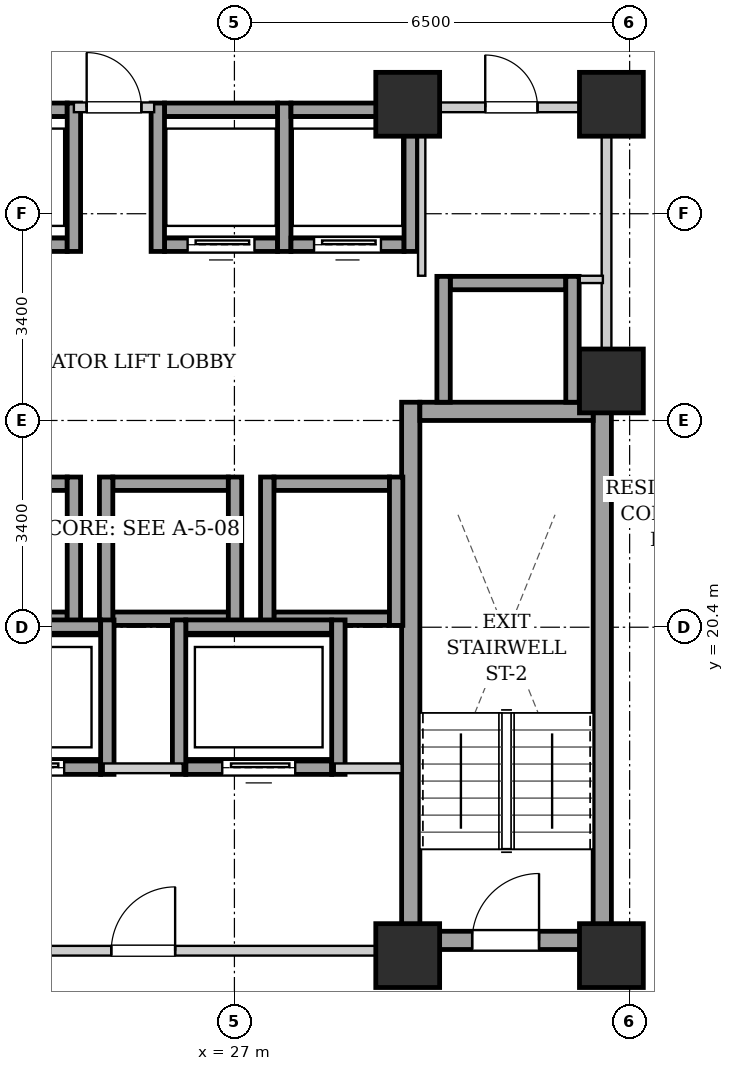
"""IFC4 building model, lengths in metres.
Left out: names, types, materials, properties, quantities, classifications, styles, units other than length and angle.
Written with IfcOpenShell. Run it as: python <this file> out.ifc"""

import sys

from ifc_helpers import new_model, si_unit, direction, frame, frame_2d, origin, origin_2d, place, context, subcontext, project, spatial, rectangle, extrude, element, fill, save


model = new_model("IFC4")
c1 = context("Model", 3, precision=1e-05, world=origin(), true_north=direction((0.0, 1.0)))
c2 = subcontext(c1, "Body", "Model", "MODEL_VIEW")
j1 = project(units=[si_unit("LENGTHUNIT", "METRE"), si_unit("PLANEANGLEUNIT", "RADIAN")], contexts=[c1])
p1 = place(None, origin())
s1 = spatial("IfcSite", under=j1, at=p1, CompositionType="ELEMENT")
p2 = place(p1, origin())
s2 = spatial("IfcBuilding", under=s1, at=p2, CompositionType="ELEMENT")
p3 = place(p2, frame((0.0, 0.0, 84.7)))
s3 = spatial("IfcBuildingStorey", under=s2, at=p3, CompositionType="ELEMENT", Elevation=84.7)
for number, where, z_axis, x_axis in (
    (1, (29.85, 15.0, 0.0), (0.0, 0.0, 1.0), (1.0, 0.0, 0.0)),
    (2, (33.2, 15.0, 0.0), (0.0, 0.0, 1.0), (1.0, 0.0, 0.0)),
    (3, (29.85, 29.0, 0.0), (0.0, 0.0, 1.0), (1.0, 0.0, 0.0)),
    (4, (33.2, 29.0, 0.0), (0.0, 0.0, 1.0), (1.0, 0.0, 0.0)),
    (5, (33.2, 24.45, 0.0), (0.0, 0.0, 1.0), (1.0, 0.0, 0.0)),
):
    element("IfcColumn", number, at=place(p3, frame(where, z_axis=z_axis, x_axis=x_axis)), inside=s3, PredefinedType="COLUMN", context=c2, shape_type="SweptSolid", body=[
        extrude(rectangle(XDim=1.05, YDim=1.05, at=origin_2d()), origin(), (0.0, 0.0, 1.0), 3.2),
    ])
for number, where, z_axis, x_axis in (
    (6, (29.9, 15.1, 0.0), (0.0, 0.0, 1.0), (0.0, 1.0, 0.0)),
    (7, (33.05, 15.1, 0.0), (0.0, 0.0, 1.0), (0.0, 1.0, 0.0)),
):
    element("IfcWall", number, at=place(p3, frame(where, z_axis=z_axis, x_axis=x_axis)), inside=s3, PredefinedType="SHEAR", context=c2, shape_type="SweptSolid", body=[
        extrude(rectangle(XDim=9.0, YDim=0.3, at=frame_2d((4.5, 0.0))), origin(), (0.0, 0.0, 1.0), 2.94),
    ])
p4 = place(p3, frame((30.05, 23.95, 0.0), z_axis=(0.0, 0.0, 1.0), x_axis=(1.0, 0.0, 0.0)))
e8 = element("IfcWall", 8, at=p4, inside=s3, PredefinedType="SHEAR", context=c2, shape_type="SweptSolid", body=[
    extrude(rectangle(XDim=2.85, YDim=0.3, at=frame_2d((1.425, 0.0))), origin(), (0.0, 0.0, 1.0), 2.94),
])
p5 = place(p3, frame((30.05, 15.25, 0.0), z_axis=(0.0, 0.0, 1.0), x_axis=(1.0, 0.0, 0.0)))
e9 = element("IfcWall", 9, at=p5, inside=s3, PredefinedType="SHEAR", context=c2, shape_type="SweptSolid", body=[
    extrude(rectangle(XDim=2.85, YDim=0.3, at=frame_2d((1.425, 0.0))), origin(), (0.0, 0.0, 1.0), 2.94),
])
p6 = place(p5, frame((0.86, 0.0, 0.0)))
e10 = element("IfcOpeningElement", 10, at=p6, cuts=e9, PredefinedType="OPENING", context=c2, shape_type="SweptSolid", body=[
    extrude(rectangle(XDim=1.1, YDim=2.05, at=frame_2d((0.55, 1.025))), frame((0.0, 0.16, 0.0), z_axis=(0.0, -1.0, 0.0), x_axis=(1.0, 0.0, 0.0)), (0.0, 0.0, 1.0), 0.32),
])
p7 = place(p3, frame((22.35, 26.69, 0.0), z_axis=(0.0, 0.0, 1.0), x_axis=(1.0, 0.0, 0.0)))
e11 = element("IfcWall", 11, at=p7, inside=s3, PredefinedType="SHEAR", context=c2, shape_type="SweptSolid", body=[
    extrude(rectangle(XDim=1.9, YDim=0.22, at=frame_2d((0.95, 0.0))), origin(), (0.0, 0.0, 1.0), 2.94),
])
p8 = place(p7, frame((0.4, 0.0, 0.0)))
e12 = element("IfcOpeningElement", 12, at=p8, cuts=e11, PredefinedType="OPENING", context=c2, shape_type="SweptSolid", body=[
    extrude(rectangle(XDim=1.1, YDim=2.15, at=frame_2d((0.55, 1.075))), frame((0.0, 0.12, 0.0), z_axis=(0.0, -1.0, 0.0), x_axis=(1.0, 0.0, 0.0)), (0.0, 0.0, 1.0), 0.24),
])
p9 = place(p3, frame((22.35, 28.91, 0.0), z_axis=(0.0, 0.0, 1.0), x_axis=(1.0, 0.0, 0.0)))
e13 = element("IfcWall", 13, at=p9, inside=s3, PredefinedType="SHEAR", context=c2, shape_type="SweptSolid", body=[
    extrude(rectangle(XDim=1.9, YDim=0.22, at=frame_2d((0.95, 0.0))), origin(), (0.0, 0.0, 1.0), 2.94),
])
p10 = place(p3, frame((24.36, 26.58, 0.0), z_axis=(0.0, 0.0, 1.0), x_axis=(0.0, 1.0, 0.0)))
e14 = element("IfcWall", 14, at=p10, inside=s3, PredefinedType="SHEAR", context=c2, shape_type="SweptSolid", body=[
    extrude(rectangle(XDim=2.44, YDim=0.22, at=frame_2d((1.22, 0.0))), origin(), (0.0, 0.0, 1.0), 2.94),
])
p11 = place(p3, frame((25.85, 26.69, 0.0), z_axis=(0.0, 0.0, 1.0), x_axis=(1.0, 0.0, 0.0)))
e15 = element("IfcWall", 15, at=p11, inside=s3, PredefinedType="SHEAR", context=c2, shape_type="SweptSolid", body=[
    extrude(rectangle(XDim=1.86, YDim=0.22, at=frame_2d((0.93, 0.0))), origin(), (0.0, 0.0, 1.0), 2.94),
])
p12 = place(p11, frame((0.38, 0.0, 0.0)))
e16 = element("IfcOpeningElement", 16, at=p12, cuts=e15, PredefinedType="OPENING", context=c2, shape_type="SweptSolid", body=[
    extrude(rectangle(XDim=1.1, YDim=2.15, at=frame_2d((0.55, 1.075))), frame((0.0, 0.12, 0.0), z_axis=(0.0, -1.0, 0.0), x_axis=(1.0, 0.0, 0.0)), (0.0, 0.0, 1.0), 0.24),
])
p13 = place(p3, frame((25.85, 28.91, 0.0), z_axis=(0.0, 0.0, 1.0), x_axis=(1.0, 0.0, 0.0)))
e17 = element("IfcWall", 17, at=p13, inside=s3, PredefinedType="SHEAR", context=c2, shape_type="SweptSolid", body=[
    extrude(rectangle(XDim=1.86, YDim=0.22, at=frame_2d((0.93, 0.0))), origin(), (0.0, 0.0, 1.0), 2.94),
])
for number, where, z_axis, x_axis in (
    (18, (25.74, 26.58, 0.0), (0.0, 0.0, 1.0), (0.0, 1.0, 0.0)),
    (19, (27.82, 26.58, 0.0), (0.0, 0.0, 1.0), (0.0, 1.0, 0.0)),
):
    element("IfcWall", number, at=place(p3, frame(where, z_axis=z_axis, x_axis=x_axis)), inside=s3, PredefinedType="SHEAR", context=c2, shape_type="SweptSolid", body=[
        extrude(rectangle(XDim=2.44, YDim=0.22, at=frame_2d((1.22, 0.0))), origin(), (0.0, 0.0, 1.0), 2.94),
    ])
p14 = place(p3, frame((27.93, 26.69, 0.0), z_axis=(0.0, 0.0, 1.0), x_axis=(1.0, 0.0, 0.0)))
e20 = element("IfcWall", 20, at=p14, inside=s3, PredefinedType="SHEAR", context=c2, shape_type="SweptSolid", body=[
    extrude(rectangle(XDim=1.86, YDim=0.22, at=frame_2d((0.93, 0.0))), origin(), (0.0, 0.0, 1.0), 2.94),
])
p15 = place(p14, frame((0.38, 0.0, 0.0)))
e21 = element("IfcOpeningElement", 21, at=p15, cuts=e20, PredefinedType="OPENING", context=c2, shape_type="SweptSolid", body=[
    extrude(rectangle(XDim=1.1, YDim=2.15, at=frame_2d((0.55, 1.075))), frame((0.0, 0.12, 0.0), z_axis=(0.0, -1.0, 0.0), x_axis=(1.0, 0.0, 0.0)), (0.0, 0.0, 1.0), 0.24),
])
p16 = place(p3, frame((27.93, 28.91, 0.0), z_axis=(0.0, 0.0, 1.0), x_axis=(1.0, 0.0, 0.0)))
e22 = element("IfcWall", 22, at=p16, inside=s3, PredefinedType="SHEAR", context=c2, shape_type="SweptSolid", body=[
    extrude(rectangle(XDim=1.86, YDim=0.22, at=frame_2d((0.93, 0.0))), origin(), (0.0, 0.0, 1.0), 2.94),
])
p17 = place(p3, frame((29.9, 26.58, 0.0), z_axis=(0.0, 0.0, 1.0), x_axis=(0.0, 1.0, 0.0)))
e23 = element("IfcWall", 23, at=p17, inside=s3, PredefinedType="SHEAR", context=c2, shape_type="SweptSolid", body=[
    extrude(rectangle(XDim=2.44, YDim=0.22, at=frame_2d((1.22, 0.0))), origin(), (0.0, 0.0, 1.0), 2.94),
])
for number, where, z_axis, x_axis in (
    (24, (22.35, 20.54, 0.0), (0.0, 0.0, 1.0), (1.0, 0.0, 0.0)),
    (25, (22.35, 22.76, 0.0), (0.0, 0.0, 1.0), (1.0, 0.0, 0.0)),
):
    element("IfcWall", number, at=place(p3, frame(where, z_axis=z_axis, x_axis=x_axis)), inside=s3, PredefinedType="SHEAR", context=c2, shape_type="SweptSolid", body=[
        extrude(rectangle(XDim=1.9, YDim=0.22, at=frame_2d((0.95, 0.0))), origin(), (0.0, 0.0, 1.0), 2.94),
    ])
p18 = place(p3, frame((24.36, 20.43, 0.0), z_axis=(0.0, 0.0, 1.0), x_axis=(0.0, 1.0, 0.0)))
e26 = element("IfcWall", 26, at=p18, inside=s3, PredefinedType="SHEAR", context=c2, shape_type="SweptSolid", body=[
    extrude(rectangle(XDim=2.44, YDim=0.22, at=frame_2d((1.22, 0.0))), origin(), (0.0, 0.0, 1.0), 2.94),
])
for number, where, z_axis, x_axis in (
    (27, (25.0, 20.54, 0.0), (0.0, 0.0, 1.0), (1.0, 0.0, 0.0)),
    (28, (25.0, 22.76, 0.0), (0.0, 0.0, 1.0), (1.0, 0.0, 0.0)),
):
    element("IfcWall", number, at=place(p3, frame(where, z_axis=z_axis, x_axis=x_axis)), inside=s3, PredefinedType="SHEAR", context=c2, shape_type="SweptSolid", body=[
        extrude(rectangle(XDim=1.9, YDim=0.22, at=frame_2d((0.95, 0.0))), origin(), (0.0, 0.0, 1.0), 2.94),
    ])
for number, where, z_axis, x_axis in (
    (29, (24.89, 20.43, 0.0), (0.0, 0.0, 1.0), (0.0, 1.0, 0.0)),
    (30, (27.01, 20.43, 0.0), (0.0, 0.0, 1.0), (0.0, 1.0, 0.0)),
):
    element("IfcWall", number, at=place(p3, frame(where, z_axis=z_axis, x_axis=x_axis)), inside=s3, PredefinedType="SHEAR", context=c2, shape_type="SweptSolid", body=[
        extrude(rectangle(XDim=2.44, YDim=0.22, at=frame_2d((1.22, 0.0))), origin(), (0.0, 0.0, 1.0), 2.94),
    ])
for number, where, z_axis, x_axis in (
    (31, (27.65, 20.54, 0.0), (0.0, 0.0, 1.0), (1.0, 0.0, 0.0)),
    (32, (27.65, 22.76, 0.0), (0.0, 0.0, 1.0), (1.0, 0.0, 0.0)),
):
    element("IfcWall", number, at=place(p3, frame(where, z_axis=z_axis, x_axis=x_axis)), inside=s3, PredefinedType="SHEAR", context=c2, shape_type="SweptSolid", body=[
        extrude(rectangle(XDim=1.9, YDim=0.22, at=frame_2d((0.95, 0.0))), origin(), (0.0, 0.0, 1.0), 2.94),
    ])
for number, where, z_axis, x_axis in (
    (33, (27.54, 20.43, 0.0), (0.0, 0.0, 1.0), (0.0, 1.0, 0.0)),
    (34, (29.66, 20.43, 0.0), (0.0, 0.0, 1.0), (0.0, 1.0, 0.0)),
):
    element("IfcWall", number, at=place(p3, frame(where, z_axis=z_axis, x_axis=x_axis)), inside=s3, PredefinedType="SHEAR", context=c2, shape_type="SweptSolid", body=[
        extrude(rectangle(XDim=2.44, YDim=0.22, at=frame_2d((1.22, 0.0))), origin(), (0.0, 0.0, 1.0), 2.94),
    ])
p19 = place(p3, frame((30.55, 26.06, 0.0), z_axis=(0.0, 0.0, 1.0), x_axis=(1.0, 0.0, 0.0)))
e35 = element("IfcWall", 35, at=p19, inside=s3, PredefinedType="SHEAR", context=c2, shape_type="SweptSolid", body=[
    extrude(rectangle(XDim=1.9, YDim=0.22, at=frame_2d((0.95, 0.0))), origin(), (0.0, 0.0, 1.0), 2.94),
])
for number, where, z_axis, x_axis in (
    (36, (30.44, 24.1, 0.0), (0.0, 0.0, 1.0), (0.0, 1.0, 0.0)),
    (37, (32.56, 24.1, 0.0), (0.0, 0.0, 1.0), (0.0, 1.0, 0.0)),
):
    element("IfcWall", number, at=place(p3, frame(where, z_axis=z_axis, x_axis=x_axis)), inside=s3, PredefinedType="SHEAR", context=c2, shape_type="SweptSolid", body=[
        extrude(rectangle(XDim=2.07, YDim=0.22, at=frame_2d((1.035, 0.0))), origin(), (0.0, 0.0, 1.0), 2.94),
    ])
p20 = place(p3, frame((22.4, 18.09, 0.0), z_axis=(0.0, 0.0, 1.0), x_axis=(1.0, 0.0, 0.0)))
e38 = element("IfcWall", 38, at=p20, inside=s3, PredefinedType="SHEAR", context=c2, shape_type="SweptSolid", body=[
    extrude(rectangle(XDim=2.4, YDim=0.22, at=frame_2d((1.2, 0.0))), origin(), (0.0, 0.0, 1.0), 2.94),
])
p21 = place(p20, frame((0.6, 0.0, 0.0)))
e39 = element("IfcOpeningElement", 39, at=p21, cuts=e38, PredefinedType="OPENING", context=c2, shape_type="SweptSolid", body=[
    extrude(rectangle(XDim=1.2, YDim=2.15, at=frame_2d((0.6, 1.075))), frame((0.0, 0.12, 0.0), z_axis=(0.0, -1.0, 0.0), x_axis=(1.0, 0.0, 0.0)), (0.0, 0.0, 1.0), 0.24),
])
p22 = place(p3, frame((22.4, 20.41, 0.0), z_axis=(0.0, 0.0, 1.0), x_axis=(1.0, 0.0, 0.0)))
e40 = element("IfcWall", 40, at=p22, inside=s3, PredefinedType="SHEAR", context=c2, shape_type="SweptSolid", body=[
    extrude(rectangle(XDim=2.4, YDim=0.22, at=frame_2d((1.2, 0.0))), origin(), (0.0, 0.0, 1.0), 2.94),
])
p23 = place(p3, frame((24.91, 17.98, 0.0), z_axis=(0.0, 0.0, 1.0), x_axis=(0.0, 1.0, 0.0)))
e41 = element("IfcWall", 41, at=p23, inside=s3, PredefinedType="SHEAR", context=c2, shape_type="SweptSolid", body=[
    extrude(rectangle(XDim=2.54, YDim=0.22, at=frame_2d((1.27, 0.0))), origin(), (0.0, 0.0, 1.0), 2.94),
])
p24 = place(p3, frame((26.2, 18.09, 0.0), z_axis=(0.0, 0.0, 1.0), x_axis=(1.0, 0.0, 0.0)))
e42 = element("IfcWall", 42, at=p24, inside=s3, PredefinedType="SHEAR", context=c2, shape_type="SweptSolid", body=[
    extrude(rectangle(XDim=2.4, YDim=0.22, at=frame_2d((1.2, 0.0))), origin(), (0.0, 0.0, 1.0), 2.94),
])
p25 = place(p24, frame((0.6, 0.0, 0.0)))
e43 = element("IfcOpeningElement", 43, at=p25, cuts=e42, PredefinedType="OPENING", context=c2, shape_type="SweptSolid", body=[
    extrude(rectangle(XDim=1.2, YDim=2.15, at=frame_2d((0.6, 1.075))), frame((0.0, 0.12, 0.0), z_axis=(0.0, -1.0, 0.0), x_axis=(1.0, 0.0, 0.0)), (0.0, 0.0, 1.0), 0.24),
])
p26 = place(p3, frame((26.2, 20.41, 0.0), z_axis=(0.0, 0.0, 1.0), x_axis=(1.0, 0.0, 0.0)))
e44 = element("IfcWall", 44, at=p26, inside=s3, PredefinedType="SHEAR", context=c2, shape_type="SweptSolid", body=[
    extrude(rectangle(XDim=2.4, YDim=0.22, at=frame_2d((1.2, 0.0))), origin(), (0.0, 0.0, 1.0), 2.94),
])
for number, where, z_axis, x_axis in (
    (45, (26.09, 17.98, 0.0), (0.0, 0.0, 1.0), (0.0, 1.0, 0.0)),
    (46, (28.71, 17.98, 0.0), (0.0, 0.0, 1.0), (0.0, 1.0, 0.0)),
):
    element("IfcWall", number, at=place(p3, frame(where, z_axis=z_axis, x_axis=x_axis)), inside=s3, PredefinedType="SHEAR", context=c2, shape_type="SweptSolid", body=[
        extrude(rectangle(XDim=2.54, YDim=0.22, at=frame_2d((1.27, 0.0))), origin(), (0.0, 0.0, 1.0), 2.94),
    ])
p27 = place(p3, frame((21.25, 15.08, 0.0), z_axis=(0.0, 0.0, 1.0), x_axis=(1.0, 0.0, 0.0)))
e47 = element("IfcWall", 47, at=p27, inside=s3, PredefinedType="PARTITIONING", context=c2, shape_type="SweptSolid", body=[
    extrude(rectangle(XDim=8.5, YDim=0.16, at=frame_2d((4.25, 0.0))), origin(), (0.0, 0.0, 1.0), 2.309),
])
p28 = place(p27, frame((3.725, 0.0, 0.0)))
e48 = element("IfcOpeningElement", 48, at=p28, cuts=e47, PredefinedType="OPENING", context=c2, shape_type="SweptSolid", body=[
    extrude(rectangle(XDim=1.05, YDim=2.05, at=frame_2d((0.525, 1.025))), frame((0.0, 0.09, 0.0), z_axis=(0.0, -1.0, 0.0), x_axis=(1.0, 0.0, 0.0)), (0.0, 0.0, 1.0), 0.18),
])
p29 = place(p3, frame((24.85, 18.08, 0.0), z_axis=(0.0, 0.0, 1.0), x_axis=(1.0, 0.0, 0.0)))
e49 = element("IfcWall", 49, at=p29, inside=s3, PredefinedType="PARTITIONING", context=c2, shape_type="SweptSolid", body=[
    extrude(rectangle(XDim=1.3, YDim=0.16, at=frame_2d((0.65, 0.0))), origin(), (0.0, 0.0, 1.0), 2.94),
])
p30 = place(p3, frame((28.65, 18.08, 0.0), z_axis=(0.0, 0.0, 1.0), x_axis=(1.0, 0.0, 0.0)))
e50 = element("IfcWall", 50, at=p30, inside=s3, PredefinedType="PARTITIONING", context=c2, shape_type="SweptSolid", body=[
    extrude(rectangle(XDim=1.1, YDim=0.16, at=frame_2d((0.55, 0.0))), origin(), (0.0, 0.0, 1.0), 2.94),
])
p31 = place(p3, frame((33.12, 24.12, 0.0), z_axis=(0.0, 0.0, 1.0), x_axis=(0.0, 1.0, 0.0)))
e51 = element("IfcWall", 51, at=p31, inside=s3, PredefinedType="PARTITIONING", context=c2, shape_type="SweptSolid", body=[
    extrude(rectangle(XDim=4.76, YDim=0.16, at=frame_2d((2.38, 0.0))), origin(), (0.0, 0.0, 1.0), 2.94),
])
p32 = place(p3, frame((24.36, 28.95, 0.0), z_axis=(0.0, 0.0, 1.0), x_axis=(1.0, 0.0, 0.0)))
e52 = element("IfcWall", 52, at=p32, inside=s3, PredefinedType="PARTITIONING", context=c2, shape_type="SweptSolid", body=[
    extrude(rectangle(XDim=1.32, YDim=0.16, at=frame_2d((0.66, 0.0))), origin(), (0.0, 0.0, 1.0), 2.309),
])
p33 = place(p32, frame((0.21, 0.0, 0.0)))
e53 = element("IfcOpeningElement", 53, at=p33, cuts=e52, PredefinedType="OPENING", context=c2, shape_type="SweptSolid", body=[
    extrude(rectangle(XDim=0.9, YDim=2.05, at=frame_2d((0.45, 1.025))), frame((0.0, 0.09, 0.0), z_axis=(0.0, -1.0, 0.0), x_axis=(1.0, 0.0, 0.0)), (0.0, 0.0, 1.0), 0.18),
])
p34 = place(p3, frame((30.08, 26.18, 0.0), z_axis=(0.0, 0.0, 1.0), x_axis=(0.0, 1.0, 0.0)))
e54 = element("IfcWall", 54, at=p34, inside=s3, PredefinedType="PARTITIONING", context=c2, shape_type="SweptSolid", body=[
    extrude(rectangle(XDim=2.68, YDim=0.12, at=frame_2d((1.34, 0.0))), origin(), (0.0, 0.0, 1.0), 2.94),
])
p35 = place(p3, frame((32.68, 26.12, 0.0), z_axis=(0.0, 0.0, 1.0), x_axis=(1.0, 0.0, 0.0)))
e55 = element("IfcWall", 55, at=p35, inside=s3, PredefinedType="PARTITIONING", context=c2, shape_type="SweptSolid", body=[
    extrude(rectangle(XDim=0.38, YDim=0.12, at=frame_2d((0.19, 0.0))), origin(), (0.0, 0.0, 1.0), 2.94),
])
p36 = place(p3, frame((30.08, 28.95, 0.0), z_axis=(0.0, 0.0, 1.0), x_axis=(1.0, 0.0, 0.0)))
e56 = element("IfcWall", 56, at=p36, inside=s3, PredefinedType="PARTITIONING", context=c2, shape_type="SweptSolid", body=[
    extrude(rectangle(XDim=2.96, YDim=0.16, at=frame_2d((1.48, 0.0))), origin(), (0.0, 0.0, 1.0), 2.94),
])
p37 = place(p36, frame((1.045, 0.0, 0.0)))
e57 = element("IfcOpeningElement", 57, at=p37, cuts=e56, PredefinedType="OPENING", context=c2, shape_type="SweptSolid", body=[
    extrude(rectangle(XDim=0.86, YDim=2.05, at=frame_2d((0.43, 1.025))), frame((0.0, 0.09, 0.0), z_axis=(0.0, -1.0, 0.0), x_axis=(1.0, 0.0, 0.0)), (0.0, 0.0, 1.0), 0.18),
])
p38 = place(p6, origin())
e58 = element("IfcDoor", 58, at=p38, inside=s3, OperationType="SINGLE_SWING_RIGHT", PredefinedType="DOOR", context=c2, shape_type="SweptSolid", body=[
    extrude(rectangle(XDim=1.1, YDim=2.05, at=frame_2d((0.55, 1.025))), frame((0.0, 0.025, 0.0), z_axis=(0.0, -1.0, 0.0), x_axis=(1.0, 0.0, 0.0)), (0.0, 0.0, 1.0), 0.05),
])
fill(e10, e58)
p39 = place(p12, origin())
e59 = element("IfcDoor", 59, at=p39, inside=s3, OperationType="SLIDING_TO_LEFT", PredefinedType="DOOR", context=c2, shape_type="SweptSolid", body=[
    extrude(rectangle(XDim=1.1, YDim=2.15, at=frame_2d((0.55, 1.075))), frame((0.0, 0.025, 0.0), z_axis=(0.0, -1.0, 0.0), x_axis=(1.0, 0.0, 0.0)), (0.0, 0.0, 1.0), 0.05),
])
fill(e16, e59)
p40 = place(p15, origin())
e60 = element("IfcDoor", 60, at=p40, inside=s3, OperationType="SLIDING_TO_LEFT", PredefinedType="DOOR", context=c2, shape_type="SweptSolid", body=[
    extrude(rectangle(XDim=1.1, YDim=2.15, at=frame_2d((0.55, 1.075))), frame((0.0, 0.025, 0.0), z_axis=(0.0, -1.0, 0.0), x_axis=(1.0, 0.0, 0.0)), (0.0, 0.0, 1.0), 0.05),
])
fill(e21, e60)
p41 = place(p21, origin())
e61 = element("IfcDoor", 61, at=p41, inside=s3, OperationType="SLIDING_TO_LEFT", PredefinedType="DOOR", context=c2, shape_type="SweptSolid", body=[
    extrude(rectangle(XDim=1.2, YDim=2.15, at=frame_2d((0.6, 1.075))), frame((0.0, 0.025, 0.0), z_axis=(0.0, -1.0, 0.0), x_axis=(1.0, 0.0, 0.0)), (0.0, 0.0, 1.0), 0.05),
])
fill(e39, e61)
p42 = place(p25, origin())
e62 = element("IfcDoor", 62, at=p42, inside=s3, OperationType="SLIDING_TO_LEFT", PredefinedType="DOOR", context=c2, shape_type="SweptSolid", body=[
    extrude(rectangle(XDim=1.2, YDim=2.15, at=frame_2d((0.6, 1.075))), frame((0.0, 0.025, 0.0), z_axis=(0.0, -1.0, 0.0), x_axis=(1.0, 0.0, 0.0)), (0.0, 0.0, 1.0), 0.05),
])
fill(e43, e62)
p43 = place(p28, origin())
e63 = element("IfcDoor", 63, at=p43, inside=s3, OperationType="SINGLE_SWING_RIGHT", PredefinedType="DOOR", context=c2, shape_type="SweptSolid", body=[
    extrude(rectangle(XDim=1.05, YDim=2.05, at=frame_2d((0.525, 1.025))), frame((0.0, 0.025, 0.0), z_axis=(0.0, -1.0, 0.0), x_axis=(1.0, 0.0, 0.0)), (0.0, 0.0, 1.0), 0.05),
])
fill(e48, e63)
p44 = place(p33, origin())
e64 = element("IfcDoor", 64, at=p44, inside=s3, OperationType="SINGLE_SWING_LEFT", PredefinedType="DOOR", context=c2, shape_type="SweptSolid", body=[
    extrude(rectangle(XDim=0.9, YDim=2.05, at=frame_2d((0.45, 1.025))), frame((0.0, 0.025, 0.0), z_axis=(0.0, -1.0, 0.0), x_axis=(1.0, 0.0, 0.0)), (0.0, 0.0, 1.0), 0.05),
])
fill(e53, e64)
p45 = place(p37, origin())
e65 = element("IfcDoor", 65, at=p45, inside=s3, OperationType="SINGLE_SWING_LEFT", PredefinedType="DOOR", context=c2, shape_type="SweptSolid", body=[
    extrude(rectangle(XDim=0.86, YDim=2.05, at=frame_2d((0.43, 1.025))), frame((0.0, 0.025, 0.0), z_axis=(0.0, -1.0, 0.0), x_axis=(1.0, 0.0, 0.0)), (0.0, 0.0, 1.0), 0.05),
])
fill(e57, e65)
save(model, sys.argv[1])
